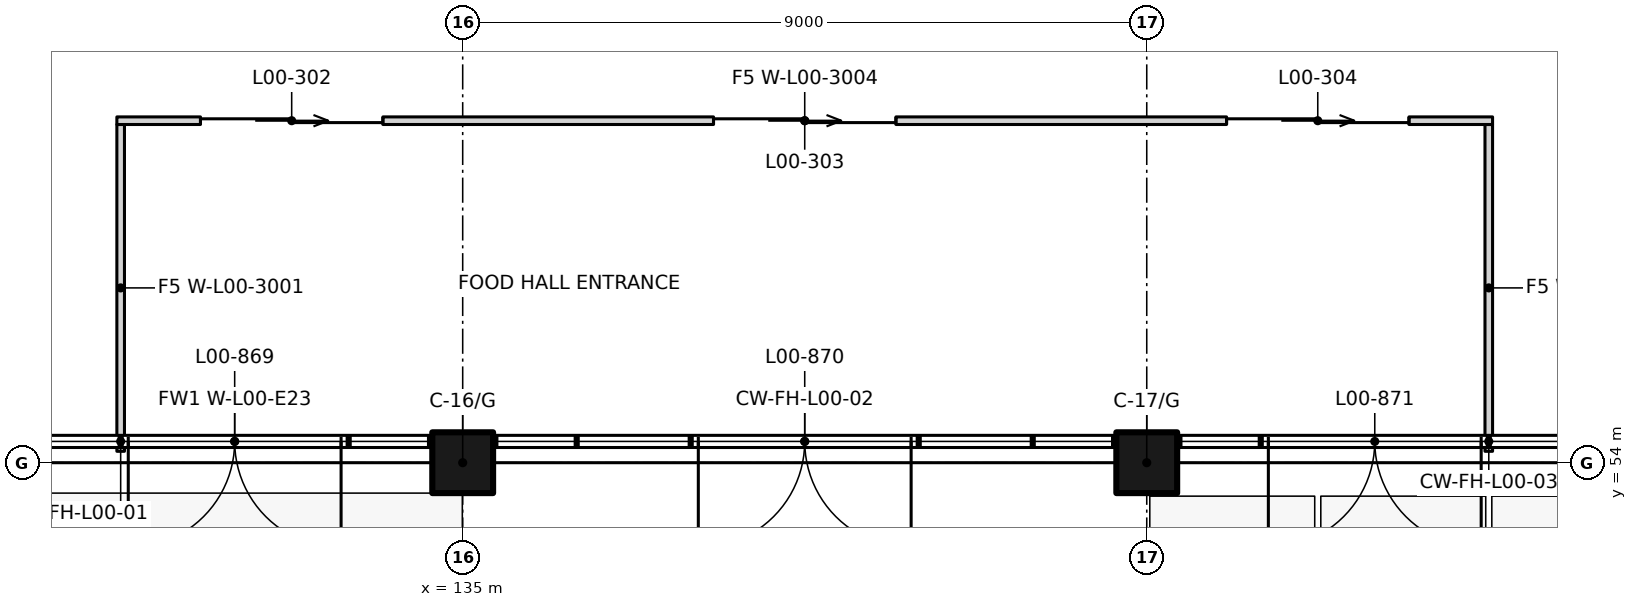
"""IFC4 building model, lengths in metres.
Left out: names, types, materials, properties, quantities, classifications, styles, units other than length and angle.
Written with IfcOpenShell. Run it as: python <this file> out.ifc"""

import sys

from ifc_helpers import new_model, si_unit, direction, frame, frame_2d, origin, origin_2d, place, context, subcontext, project, spatial, rectangle, extrude, element, fill, save


model = new_model("IFC4")
c1 = context("Model", 3, precision=1e-05, world=origin(), true_north=direction((0.0, 1.0)))
c2 = subcontext(c1, "Body", "Model", "MODEL_VIEW")
j1 = project(units=[si_unit("LENGTHUNIT", "METRE"), si_unit("PLANEANGLEUNIT", "RADIAN")], contexts=[c1])
p1 = place(None, origin())
s1 = spatial("IfcSite", under=j1, at=p1, CompositionType="ELEMENT")
p2 = place(p1, origin())
s2 = spatial("IfcBuilding", under=s1, at=p2, CompositionType="ELEMENT")
p3 = place(p2, origin())
s3 = spatial("IfcBuildingStorey", under=s2, at=p3, CompositionType="ELEMENT", Elevation=0.0)
for number, where, z_axis, x_axis in (
    (1, (135.0, 54.0, 0.0), (0.0, 0.0, 1.0), (1.0, 0.0, 0.0)),
    (2, (144.0, 54.0, 0.0), (0.0, 0.0, 1.0), (1.0, 0.0, 0.0)),
):
    element("IfcColumn", number, at=place(p3, frame(where, z_axis=z_axis, x_axis=x_axis)), inside=s3, PredefinedType="COLUMN", context=c2, shape_type="SweptSolid", body=[
        extrude(rectangle(XDim=0.8, YDim=0.8, at=origin_2d()), origin(), (0.0, 0.0, 1.0), 6.0),
    ])
p4 = place(p3, frame((133.47, 54.28, 0.0), z_axis=(0.0, 0.0, 1.0), x_axis=(-1.0, 0.0, 0.0)))
e3 = element("IfcWall", 3, at=p4, inside=s3, PredefinedType="STANDARD", context=c2, shape_type="SweptSolid", body=[
    extrude(rectangle(XDim=2.94, YDim=0.12, at=frame_2d((1.47, 0.0))), origin(), (0.0, 0.0, 1.0), 2.97),
])
p5 = place(p4, frame((0.07, 0.0, 0.0)))
e4 = element("IfcOpeningElement", 4, at=p5, cuts=e3, PredefinedType="OPENING", context=c2, shape_type="SweptSolid", body=[
    extrude(rectangle(XDim=2.8, YDim=2.4, at=frame_2d((1.4, 1.2))), frame((0.0, 0.07, 0.0), z_axis=(0.0, -1.0, 0.0), x_axis=(1.0, 0.0, 0.0)), (0.0, 0.0, 1.0), 0.14),
])
p6 = place(p3, frame((140.97, 54.28, 0.0), z_axis=(0.0, 0.0, 1.0), x_axis=(-1.0, 0.0, 0.0)))
e5 = element("IfcWall", 5, at=p6, inside=s3, PredefinedType="STANDARD", context=c2, shape_type="SweptSolid", body=[
    extrude(rectangle(XDim=2.94, YDim=0.12, at=frame_2d((1.47, 0.0))), origin(), (0.0, 0.0, 1.0), 2.97),
])
p7 = place(p6, frame((0.07, 0.0, 0.0)))
e6 = element("IfcOpeningElement", 6, at=p7, cuts=e5, PredefinedType="OPENING", context=c2, shape_type="SweptSolid", body=[
    extrude(rectangle(XDim=2.8, YDim=2.4, at=frame_2d((1.4, 1.2))), frame((0.0, 0.07, 0.0), z_axis=(0.0, -1.0, 0.0), x_axis=(1.0, 0.0, 0.0)), (0.0, 0.0, 1.0), 0.14),
])
p8 = place(p3, frame((148.47, 54.28, 0.0), z_axis=(0.0, 0.0, 1.0), x_axis=(-1.0, 0.0, 0.0)))
e7 = element("IfcWall", 7, at=p8, inside=s3, PredefinedType="STANDARD", context=c2, shape_type="SweptSolid", body=[
    extrude(rectangle(XDim=2.94, YDim=0.12, at=frame_2d((1.47, 0.0))), origin(), (0.0, 0.0, 1.0), 2.97),
])
p9 = place(p8, frame((0.07, 0.0, 0.0)))
e8 = element("IfcOpeningElement", 8, at=p9, cuts=e7, PredefinedType="OPENING", context=c2, shape_type="SweptSolid", body=[
    extrude(rectangle(XDim=2.8, YDim=2.4, at=frame_2d((1.4, 1.2))), frame((0.0, 0.07, 0.0), z_axis=(0.0, -1.0, 0.0), x_axis=(1.0, 0.0, 0.0)), (0.0, 0.0, 1.0), 0.14),
])
for number, where, z_axis, x_axis in (
    (9, (130.5, 54.15, 0.0), (0.0, 0.0, 1.0), (0.0, 1.0, 0.0)),
    (10, (148.5, 54.15, 0.0), (0.0, 0.0, 1.0), (0.0, 1.0, 0.0)),
):
    element("IfcWall", number, at=place(p3, frame(where, z_axis=z_axis, x_axis=x_axis)), inside=s3, PredefinedType="PARTITIONING", context=c2, shape_type="SweptSolid", body=[
        extrude(rectangle(XDim=4.3, YDim=0.1, at=frame_2d((2.15, 0.0))), origin(), (0.0, 0.0, 1.0), 5.7),
    ])
p10 = place(p3, frame((130.45, 58.5, 0.0), z_axis=(0.0, 0.0, 1.0), x_axis=(1.0, 0.0, 0.0)))
e11 = element("IfcWall", 11, at=p10, inside=s3, PredefinedType="PARTITIONING", context=c2, shape_type="SweptSolid", body=[
    extrude(rectangle(XDim=18.1, YDim=0.1, at=frame_2d((9.05, 0.0))), origin(), (0.0, 0.0, 1.0), 5.7),
])
p11 = place(p10, frame((1.1, 0.0, 0.0)))
e12 = element("IfcOpeningElement", 12, at=p11, cuts=e11, PredefinedType="OPENING", context=c2, shape_type="SweptSolid", body=[
    extrude(rectangle(XDim=2.4, YDim=2.4, at=frame_2d((1.2, 1.2))), frame((0.0, 0.06, 0.0), z_axis=(0.0, -1.0, 0.0), x_axis=(1.0, 0.0, 0.0)), (0.0, 0.0, 1.0), 0.12),
])
p12 = place(p10, frame((7.85, 0.0, 0.0)))
e13 = element("IfcOpeningElement", 13, at=p12, cuts=e11, PredefinedType="OPENING", context=c2, shape_type="SweptSolid", body=[
    extrude(rectangle(XDim=2.4, YDim=2.4, at=frame_2d((1.2, 1.2))), frame((0.0, 0.06, 0.0), z_axis=(0.0, -1.0, 0.0), x_axis=(1.0, 0.0, 0.0)), (0.0, 0.0, 1.0), 0.12),
])
p13 = place(p10, frame((14.6, 0.0, 0.0)))
e14 = element("IfcOpeningElement", 14, at=p13, cuts=e11, PredefinedType="OPENING", context=c2, shape_type="SweptSolid", body=[
    extrude(rectangle(XDim=2.4, YDim=2.4, at=frame_2d((1.2, 1.2))), frame((0.0, 0.06, 0.0), z_axis=(0.0, -1.0, 0.0), x_axis=(1.0, 0.0, 0.0)), (0.0, 0.0, 1.0), 0.12),
])
p14 = place(p5, origin())
e15 = element("IfcDoor", 15, at=p14, inside=s3, OperationType="DOUBLE_DOOR_SINGLE_SWING", PredefinedType="DOOR", context=c2, shape_type="SweptSolid", body=[
    extrude(rectangle(XDim=2.8, YDim=2.4, at=frame_2d((1.4, 1.2))), frame((0.0, 0.025, 0.0), z_axis=(0.0, -1.0, 0.0), x_axis=(1.0, 0.0, 0.0)), (0.0, 0.0, 1.0), 0.05),
])
fill(e4, e15)
p15 = place(p7, origin())
e16 = element("IfcDoor", 16, at=p15, inside=s3, OperationType="DOUBLE_DOOR_SINGLE_SWING", PredefinedType="DOOR", context=c2, shape_type="SweptSolid", body=[
    extrude(rectangle(XDim=2.8, YDim=2.4, at=frame_2d((1.4, 1.2))), frame((0.0, 0.025, 0.0), z_axis=(0.0, -1.0, 0.0), x_axis=(1.0, 0.0, 0.0)), (0.0, 0.0, 1.0), 0.05),
])
fill(e6, e16)
p16 = place(p9, origin())
e17 = element("IfcDoor", 17, at=p16, inside=s3, OperationType="DOUBLE_DOOR_SINGLE_SWING", PredefinedType="DOOR", context=c2, shape_type="SweptSolid", body=[
    extrude(rectangle(XDim=2.8, YDim=2.4, at=frame_2d((1.4, 1.2))), frame((0.0, 0.025, 0.0), z_axis=(0.0, -1.0, 0.0), x_axis=(1.0, 0.0, 0.0)), (0.0, 0.0, 1.0), 0.05),
])
fill(e8, e17)
p17 = place(p11, origin())
e18 = element("IfcDoor", 18, at=p17, inside=s3, OperationType="SINGLE_SWING_LEFT", PredefinedType="DOOR", context=c2, shape_type="SweptSolid", body=[
    extrude(rectangle(XDim=2.4, YDim=2.4, at=frame_2d((1.2, 1.2))), frame((0.0, 0.025, 0.0), z_axis=(0.0, -1.0, 0.0), x_axis=(1.0, 0.0, 0.0)), (0.0, 0.0, 1.0), 0.05),
])
fill(e12, e18)
p18 = place(p12, origin())
e19 = element("IfcDoor", 19, at=p18, inside=s3, OperationType="SINGLE_SWING_LEFT", PredefinedType="DOOR", context=c2, shape_type="SweptSolid", body=[
    extrude(rectangle(XDim=2.4, YDim=2.4, at=frame_2d((1.2, 1.2))), frame((0.0, 0.025, 0.0), z_axis=(0.0, -1.0, 0.0), x_axis=(1.0, 0.0, 0.0)), (0.0, 0.0, 1.0), 0.05),
])
fill(e13, e19)
p19 = place(p13, origin())
e20 = element("IfcDoor", 20, at=p19, inside=s3, OperationType="SINGLE_SWING_LEFT", PredefinedType="DOOR", context=c2, shape_type="SweptSolid", body=[
    extrude(rectangle(XDim=2.4, YDim=2.4, at=frame_2d((1.2, 1.2))), frame((0.0, 0.025, 0.0), z_axis=(0.0, -1.0, 0.0), x_axis=(1.0, 0.0, 0.0)), (0.0, 0.0, 1.0), 0.05),
])
fill(e14, e20)
save(model, sys.argv[1])
